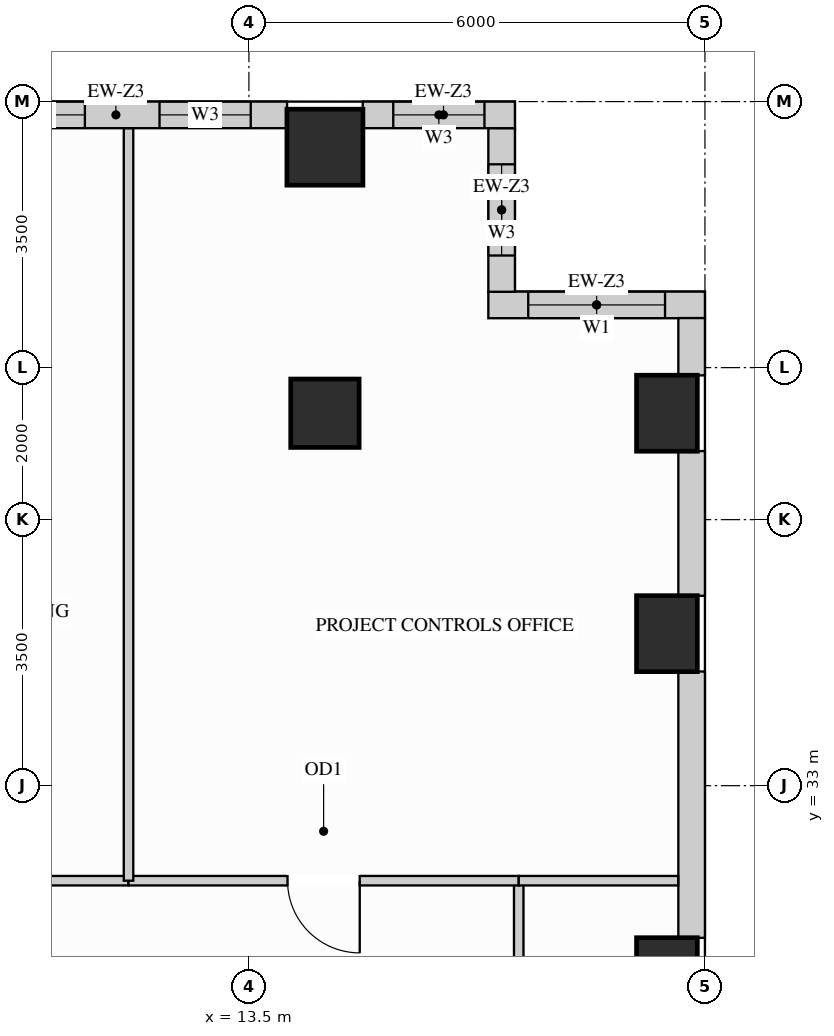
"""IFC4 building model, lengths in metres.
Left out: names, types, materials, properties, quantities, classifications, styles, units other than length and angle.
Written with IfcOpenShell. Run it as: python <this file> out.ifc"""

import sys

from ifc_helpers import new_model, si_unit, direction, frame, frame_2d, origin, origin_2d, place, context, subcontext, project, spatial, rectangle, extrude, source, transform, mapped, element, fill, save


model = new_model("IFC4")
c1 = context("Model", 3, precision=1e-05, world=origin(), true_north=direction((0.0, 1.0)))
c2 = subcontext(c1, "Body", "Model", "MODEL_VIEW")
j1 = project(units=[si_unit("LENGTHUNIT", "METRE"), si_unit("PLANEANGLEUNIT", "RADIAN")], contexts=[c1])
p1 = place(None, origin())
s1 = spatial("IfcSite", under=j1, at=p1, CompositionType="ELEMENT")
p2 = place(p1, origin())
s2 = spatial("IfcBuilding", under=s1, at=p2, CompositionType="ELEMENT")
p3 = place(p2, frame((0.0, 0.0, 150.3)))
s3 = spatial("IfcBuildingStorey", under=s2, at=p3, CompositionType="ELEMENT", Elevation=150.3)
m1 = source(origin(), c2, "Body", "SweptSolid", [
    extrude(rectangle(XDim=0.9, YDim=0.9, at=origin_2d()), origin(), (0.0, 0.0, 1.0), 3.4),
])
p4 = place(p3, frame((14.5, 37.9, 0.0), z_axis=(0.0, 0.0, 1.0), x_axis=(1.0, 0.0, 0.0)))
e1 = element("IfcColumn", 1, at=p4, inside=s3, PredefinedType="COLUMN", context=c2, shape_type="MappedRepresentation", body=[
    mapped(m1, transform((0.0, 0.0, 0.0), x_axis=(1.0, 0.0, 0.0), y_axis=(0.0, 1.0, 0.0), z_axis=(0.0, 0.0, 1.0))),
])
m2 = source(origin(), c2, "Body", "SweptSolid", [
    extrude(rectangle(XDim=0.8, YDim=1.0, at=origin_2d()), origin(), (0.0, 0.0, 1.0), 3.4),
])
for number, where, z_axis, x_axis in (
    (2, (19.0, 30.5, 0.0), (0.0, 0.0, 1.0), (1.0, 0.0, 0.0)),
    (3, (19.0, 35.0, 0.0), (0.0, 0.0, 1.0), (1.0, 0.0, 0.0)),
    (4, (19.0, 37.9, 0.0), (0.0, 0.0, 1.0), (1.0, 0.0, 0.0)),
):
    element("IfcColumn", number, at=place(p3, frame(where, z_axis=z_axis, x_axis=x_axis)), inside=s3, PredefinedType="COLUMN", context=c2, shape_type="MappedRepresentation", body=[
        mapped(m2, transform((0.0, 0.0, 0.0), x_axis=(1.0, 0.0, 0.0), y_axis=(0.0, 1.0, 0.0), z_axis=(0.0, 0.0, 1.0))),
    ])
m3 = source(origin(), c2, "Body", "SweptSolid", [
    extrude(rectangle(XDim=1.0, YDim=1.0, at=origin_2d()), origin(), (0.0, 0.0, 1.0), 3.4),
])
p5 = place(p3, frame((14.5, 41.4, 0.0), z_axis=(0.0, 0.0, 1.0), x_axis=(1.0, 0.0, 0.0)))
e5 = element("IfcColumn", 5, at=p5, inside=s3, PredefinedType="COLUMN", context=c2, shape_type="MappedRepresentation", body=[
    mapped(m3, transform((0.0, 0.0, 0.0), x_axis=(1.0, 0.0, 0.0), y_axis=(0.0, 1.0, 0.0), z_axis=(0.0, 0.0, 1.0))),
])
p6 = place(p3, frame((19.5, 39.325, 0.0), z_axis=(0.0, 0.0, 1.0), x_axis=(-1.0, 0.0, 0.0)))
e6 = element("IfcWall", 6, at=p6, inside=s3, PredefinedType="SOLIDWALL", context=c2, shape_type="SweptSolid", body=[
    extrude(rectangle(XDim=2.85, YDim=0.35, at=frame_2d((1.425, 0.0))), origin(), (0.0, 0.0, 1.0), 3.385),
])
p7 = place(p6, frame((0.525, 0.0, 0.78)))
e7 = element("IfcOpeningElement", 7, at=p7, cuts=e6, PredefinedType="OPENING", context=c2, shape_type="SweptSolid", body=[
    extrude(rectangle(XDim=1.8, YDim=2.1, at=frame_2d((0.9, 1.05))), frame((0.0, 0.185, 0.0), z_axis=(0.0, -1.0, 0.0), x_axis=(1.0, 0.0, 0.0)), (0.0, 0.0, 1.0), 0.37),
])
p8 = place(p3, frame((16.825, 39.498, 0.0), z_axis=(0.0, 0.0, 1.0), x_axis=(0.0, 1.0, 0.0)))
e8 = element("IfcWall", 8, at=p8, inside=s3, PredefinedType="SOLIDWALL", context=c2, shape_type="SweptSolid", body=[
    extrude(rectangle(XDim=2.154, YDim=0.35, at=frame_2d((1.077, 0.0))), origin(), (0.0, 0.0, 1.0), 3.385),
])
p9 = place(p8, frame((0.477, 0.0, 0.78)))
e9 = element("IfcOpeningElement", 9, at=p9, cuts=e8, PredefinedType="OPENING", context=c2, shape_type="SweptSolid", body=[
    extrude(rectangle(XDim=1.2, YDim=2.1, at=frame_2d((0.6, 1.05))), frame((0.0, 0.185, 0.0), z_axis=(0.0, -1.0, 0.0), x_axis=(1.0, 0.0, 0.0)), (0.0, 0.0, 1.0), 0.37),
])
p10 = place(p3, frame((17.0, 41.825, 0.0), z_axis=(0.0, 0.0, 1.0), x_axis=(-1.0, 0.0, 0.0)))
e10 = element("IfcWall", 10, at=p10, inside=s3, PredefinedType="SOLIDWALL", context=c2, shape_type="SweptSolid", body=[
    extrude(rectangle(XDim=2.002, YDim=0.35, at=frame_2d((1.001, 0.0))), origin(), (0.0, 0.0, 1.0), 3.385),
])
p11 = place(p10, frame((0.401, 0.0, 0.78)))
e11 = element("IfcOpeningElement", 11, at=p11, cuts=e10, PredefinedType="OPENING", context=c2, shape_type="SweptSolid", body=[
    extrude(rectangle(XDim=1.2, YDim=2.1, at=frame_2d((0.6, 1.05))), frame((0.0, 0.185, 0.0), z_axis=(0.0, -1.0, 0.0), x_axis=(1.0, 0.0, 0.0)), (0.0, 0.0, 1.0), 0.37),
])
p12 = place(p3, frame((14.002, 41.825, 0.0), z_axis=(0.0, 0.0, 1.0), x_axis=(-1.0, 0.0, 0.0)))
e12 = element("IfcWall", 12, at=p12, inside=s3, PredefinedType="SOLIDWALL", context=c2, shape_type="SweptSolid", body=[
    extrude(rectangle(XDim=4.504, YDim=0.35, at=frame_2d((2.252, 0.0))), origin(), (0.0, 0.0, 1.0), 2.612),
])
p13 = place(p12, frame((0.478, 0.0, 0.78)))
e13 = element("IfcOpeningElement", 13, at=p13, cuts=e12, PredefinedType="OPENING", context=c2, shape_type="SweptSolid", body=[
    extrude(rectangle(XDim=1.2, YDim=1.652, at=frame_2d((0.6, 0.826))), frame((0.0, 0.185, 0.0), z_axis=(0.0, -1.0, 0.0), x_axis=(1.0, 0.0, 0.0)), (0.0, 0.0, 1.0), 0.37),
])
p14 = place(p12, frame((2.66, 0.0, 0.78)))
e14 = element("IfcOpeningElement", 14, at=p14, cuts=e12, PredefinedType="OPENING", context=c2, shape_type="SweptSolid", body=[
    extrude(rectangle(XDim=1.2, YDim=1.652, at=frame_2d((0.6, 0.826))), frame((0.0, 0.185, 0.0), z_axis=(0.0, -1.0, 0.0), x_axis=(1.0, 0.0, 0.0)), (0.0, 0.0, 1.0), 0.37),
])
m4 = source(origin(), c2, "Body", "SweptSolid", [
    extrude(rectangle(XDim=3.504, YDim=0.35, at=frame_2d((1.752, 0.0))), origin(), (0.0, 0.0, 1.0), 2.612),
])
p15 = place(p3, frame((19.325, 30.998, 0.0), z_axis=(0.0, 0.0, 1.0), x_axis=(0.0, 1.0, 0.0)))
e15 = element("IfcWall", 15, at=p15, inside=s3, PredefinedType="SOLIDWALL", context=c2, shape_type="MappedRepresentation", body=[
    mapped(m4, transform((0.0, 0.0, 0.0), x_axis=(1.0, 0.0, 0.0), y_axis=(0.0, 1.0, 0.0), z_axis=(0.0, 0.0, 1.0))),
])
m5 = source(origin(), c2, "Body", "SweptSolid", [
    extrude(rectangle(XDim=1.904, YDim=0.35, at=frame_2d((0.952, 0.0))), origin(), (0.0, 0.0, 1.0), 2.612),
])
p16 = place(p3, frame((19.325, 35.498, 0.0), z_axis=(0.0, 0.0, 1.0), x_axis=(0.0, 1.0, 0.0)))
e16 = element("IfcWall", 16, at=p16, inside=s3, PredefinedType="SOLIDWALL", context=c2, shape_type="MappedRepresentation", body=[
    mapped(m5, transform((0.0, 0.0, 0.0), x_axis=(1.0, 0.0, 0.0), y_axis=(0.0, 1.0, 0.0), z_axis=(0.0, 0.0, 1.0))),
])
m6 = source(origin(), c2, "Body", "SweptSolid", [
    extrude(rectangle(XDim=0.754, YDim=0.35, at=frame_2d((0.377, 0.0))), origin(), (0.0, 0.0, 1.0), 3.385),
])
p17 = place(p3, frame((19.325, 38.398, 0.0), z_axis=(0.0, 0.0, 1.0), x_axis=(0.0, 1.0, 0.0)))
e17 = element("IfcWall", 17, at=p17, inside=s3, PredefinedType="SOLIDWALL", context=c2, shape_type="MappedRepresentation", body=[
    mapped(m6, transform((0.0, 0.0, 0.0), x_axis=(1.0, 0.0, 0.0), y_axis=(0.0, 1.0, 0.0), z_axis=(0.0, 0.0, 1.0))),
])
p18 = place(p3, frame((17.05, 26.05, 0.0), z_axis=(0.0, 0.0, 1.0), x_axis=(0.0, 1.0, 0.0)))
e18 = element("IfcWall", 18, at=p18, inside=s3, PredefinedType="PARTITIONING", context=c2, shape_type="SweptSolid", body=[
    extrude(rectangle(XDim=5.7, YDim=0.125, at=frame_2d((2.85, 0.0))), origin(), (0.0, 0.0, 1.0), 3.385),
])
p19 = place(p18, frame((2.375, 0.0, 0.0)))
e19 = element("IfcOpeningElement", 19, at=p19, cuts=e18, PredefinedType="OPENING", context=c2, shape_type="SweptSolid", body=[
    extrude(rectangle(XDim=0.95, YDim=2.15, at=frame_2d((0.475, 1.075))), frame((0.0, 0.073, 0.0), z_axis=(0.0, -1.0, 0.0), x_axis=(1.0, 0.0, 0.0)), (0.0, 0.0, 1.0), 0.145),
])
p20 = place(p3, frame((7.121, 31.75, 0.0), z_axis=(0.0, 0.0, 1.0), x_axis=(1.0, 0.0, 0.0)))
e20 = element("IfcWall", 20, at=p20, inside=s3, PredefinedType="PARTITIONING", context=c2, shape_type="SweptSolid", body=[
    extrude(rectangle(XDim=4.795, YDim=0.125, at=frame_2d((2.397, 0.0))), origin(), (0.0, 0.0, 1.0), 2.848),
])
p21 = place(p20, frame((1.923, 0.0, 0.0)))
e21 = element("IfcOpeningElement", 21, at=p21, cuts=e20, PredefinedType="OPENING", context=c2, shape_type="SweptSolid", body=[
    extrude(rectangle(XDim=0.95, YDim=2.15, at=frame_2d((0.475, 1.075))), frame((0.0, 0.073, 0.0), z_axis=(0.0, -1.0, 0.0), x_axis=(1.0, 0.0, 0.0)), (0.0, 0.0, 1.0), 0.145),
])
p22 = place(p3, frame((11.916, 31.75, 0.0), z_axis=(0.0, 0.0, 1.0), x_axis=(1.0, 0.0, 0.0)))
e22 = element("IfcWall", 22, at=p22, inside=s3, PredefinedType="PARTITIONING", context=c2, shape_type="SweptSolid", body=[
    extrude(rectangle(XDim=5.134, YDim=0.125, at=frame_2d((2.567, 0.0))), origin(), (0.0, 0.0, 1.0), 2.848),
])
p23 = place(p22, frame((2.092, 0.0, 0.0)))
e23 = element("IfcOpeningElement", 23, at=p23, cuts=e22, PredefinedType="OPENING", context=c2, shape_type="SweptSolid", body=[
    extrude(rectangle(XDim=0.95, YDim=2.15, at=frame_2d((0.475, 1.075))), frame((0.0, 0.073, 0.0), z_axis=(0.0, -1.0, 0.0), x_axis=(1.0, 0.0, 0.0)), (0.0, 0.0, 1.0), 0.145),
])
m7 = source(origin(), c2, "Body", "SweptSolid", [
    extrude(rectangle(XDim=2.098, YDim=0.125, at=frame_2d((1.049, 0.0))), origin(), (0.0, 0.0, 1.0), 2.848),
])
p24 = place(p3, frame((17.05, 31.75, 0.0), z_axis=(0.0, 0.0, 1.0), x_axis=(1.0, 0.0, 0.0)))
e24 = element("IfcWall", 24, at=p24, inside=s3, PredefinedType="PARTITIONING", context=c2, shape_type="MappedRepresentation", body=[
    mapped(m7, transform((0.0, 0.0, 0.0), x_axis=(1.0, 0.0, 0.0), y_axis=(0.0, 1.0, 0.0), z_axis=(0.0, 0.0, 1.0))),
])
m8 = source(origin(), c2, "Body", "SweptSolid", [
    extrude(rectangle(XDim=9.898, YDim=0.125, at=frame_2d((4.949, 0.0))), origin(), (0.0, 0.0, 1.0), 3.385),
])
p25 = place(p3, frame((11.916, 31.75, 0.0), z_axis=(0.0, 0.0, 1.0), x_axis=(0.0, 1.0, 0.0)))
e25 = element("IfcWall", 25, at=p25, inside=s3, PredefinedType="PARTITIONING", context=c2, shape_type="MappedRepresentation", body=[
    mapped(m8, transform((0.0, 0.0, 0.0), x_axis=(1.0, 0.0, 0.0), y_axis=(0.0, 1.0, 0.0), z_axis=(0.0, 0.0, 1.0))),
])
m9 = source(origin(), c2, "Body", "SweptSolid", [
    extrude(rectangle(XDim=0.95, YDim=2.15, at=frame_2d((0.475, 1.075))), frame((0.0, 0.025, 0.0), z_axis=(0.0, -1.0, 0.0), x_axis=(1.0, 0.0, 0.0)), (0.0, 0.0, 1.0), 0.05),
])
p26 = place(p23, origin())
e26 = element("IfcDoor", 26, at=p26, inside=s3, OperationType="SINGLE_SWING_RIGHT", PredefinedType="DOOR", context=c2, shape_type="MappedRepresentation", body=[
    mapped(m9, transform((0.0, 0.0, 0.0), x_axis=(1.0, 0.0, 0.0), y_axis=(0.0, 1.0, 0.0), z_axis=(0.0, 0.0, 1.0))),
])
fill(e23, e26)
m10 = source(origin(), c2, "Body", "SweptSolid", [
    extrude(rectangle(XDim=1.8, YDim=2.1, at=frame_2d((0.9, 1.05))), frame((0.0, 0.03, 0.0), z_axis=(0.0, -1.0, 0.0), x_axis=(1.0, 0.0, 0.0)), (0.0, 0.0, 1.0), 0.06),
])
p27 = place(p7, origin())
e27 = element("IfcWindow", 27, at=p27, inside=s3, PartitioningType="SINGLE_PANEL", PredefinedType="WINDOW", context=c2, shape_type="MappedRepresentation", body=[
    mapped(m10, transform((0.0, 0.0, 0.0), x_axis=(1.0, 0.0, 0.0), y_axis=(0.0, 1.0, 0.0), z_axis=(0.0, 0.0, 1.0))),
])
fill(e7, e27)
m11 = source(origin(), c2, "Body", "SweptSolid", [
    extrude(rectangle(XDim=1.2, YDim=2.1, at=frame_2d((0.6, 1.05))), frame((0.0, 0.03, 0.0), z_axis=(0.0, -1.0, 0.0), x_axis=(1.0, 0.0, 0.0)), (0.0, 0.0, 1.0), 0.06),
])
p28 = place(p9, origin())
e28 = element("IfcWindow", 28, at=p28, inside=s3, PartitioningType="SINGLE_PANEL", PredefinedType="WINDOW", context=c2, shape_type="MappedRepresentation", body=[
    mapped(m11, transform((0.0, 0.0, 0.0), x_axis=(1.0, 0.0, 0.0), y_axis=(0.0, 1.0, 0.0), z_axis=(0.0, 0.0, 1.0))),
])
fill(e9, e28)
p29 = place(p11, origin())
e29 = element("IfcWindow", 29, at=p29, inside=s3, PartitioningType="SINGLE_PANEL", PredefinedType="WINDOW", context=c2, shape_type="MappedRepresentation", body=[
    mapped(m11, transform((0.0, 0.0, 0.0), x_axis=(1.0, 0.0, 0.0), y_axis=(0.0, 1.0, 0.0), z_axis=(0.0, 0.0, 1.0))),
])
fill(e11, e29)
m12 = source(origin(), c2, "Body", "SweptSolid", [
    extrude(rectangle(XDim=1.2, YDim=1.652, at=frame_2d((0.6, 0.826))), frame((0.0, 0.03, 0.0), z_axis=(0.0, -1.0, 0.0), x_axis=(1.0, 0.0, 0.0)), (0.0, 0.0, 1.0), 0.06),
])
p30 = place(p13, origin())
e30 = element("IfcWindow", 30, at=p30, inside=s3, PartitioningType="SINGLE_PANEL", PredefinedType="WINDOW", context=c2, shape_type="MappedRepresentation", body=[
    mapped(m12, transform((0.0, 0.0, 0.0), x_axis=(1.0, 0.0, 0.0), y_axis=(0.0, 1.0, 0.0), z_axis=(0.0, 0.0, 1.0))),
])
fill(e13, e30)
p31 = place(p14, origin())
e31 = element("IfcWindow", 31, at=p31, inside=s3, PartitioningType="SINGLE_PANEL", PredefinedType="WINDOW", context=c2, shape_type="MappedRepresentation", body=[
    mapped(m12, transform((0.0, 0.0, 0.0), x_axis=(1.0, 0.0, 0.0), y_axis=(0.0, 1.0, 0.0), z_axis=(0.0, 0.0, 1.0))),
])
fill(e14, e31)
save(model, sys.argv[1])
